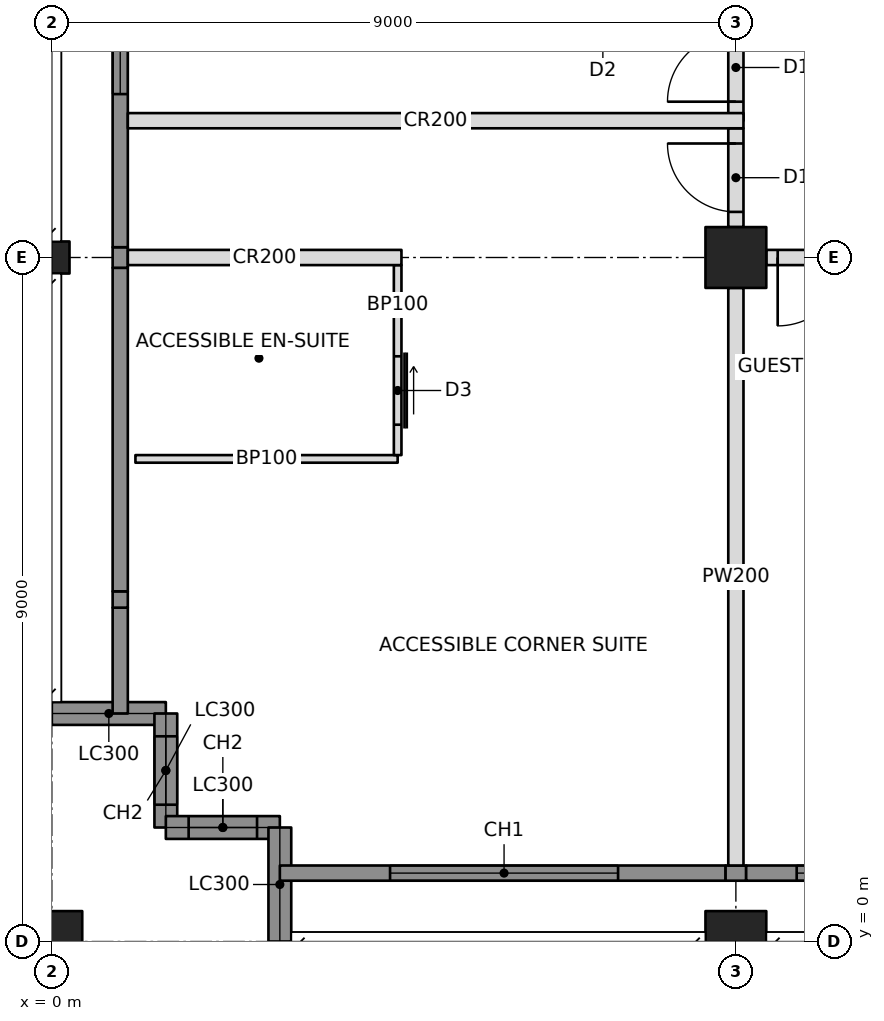
"""IFC4 building model, lengths in metres.
Left out: names, types, materials, properties, quantities, classifications, styles, units other than length and angle.
Written with IfcOpenShell. Run it as: python <this file> out.ifc"""

import sys

from ifc_helpers import new_model, si_unit, direction, frame, frame_2d, origin, origin_with_axes, origin_2d, place, context, subcontext, project, spatial, rectangle, hollow_rectangle, i_section, extrude, element, fill, save


model = new_model("IFC4")
c1 = context("Model", 3, precision=1e-05, world=origin(), true_north=direction((0.0, 1.0)))
c2 = subcontext(c1, "Body", "Model", "MODEL_VIEW")
j1 = project(units=[si_unit("LENGTHUNIT", "METRE"), si_unit("PLANEANGLEUNIT", "RADIAN")], contexts=[c1])
p1 = place(None, origin())
s1 = spatial("IfcSite", under=j1, at=p1, CompositionType="ELEMENT")
p2 = place(p1, origin())
s2 = spatial("IfcBuilding", under=s1, at=p2, CompositionType="ELEMENT")
p3 = place(p2, frame((0.0, 0.0, 244.6)))
s3 = spatial("IfcBuildingStorey", under=s2, at=p3, CompositionType="ELEMENT", Elevation=244.6)
p4 = place(p3, origin_with_axes())
e1 = element("IfcColumn", 1, at=p4, inside=s3, PredefinedType="COLUMN", context=c2, shape_type="SweptSolid", body=[
    extrude(hollow_rectangle(XDim=0.8, YDim=0.8, WallThickness=0.05, at=origin_2d()), origin(), (0.0, 0.0, 1.0), 3.6),
])
p5 = place(p3, frame((0.0, 9.0, 0.0), z_axis=(0.0, 0.0, 1.0), x_axis=(0.0, 1.0, 0.0)))
e2 = element("IfcColumn", 2, at=p5, inside=s3, PredefinedType="COLUMN", context=c2, shape_type="SweptSolid", body=[
    extrude(i_section(OverallWidth=0.422, OverallDepth=0.465, WebThickness=0.045, FlangeThickness=0.073, at=origin_2d()), origin(), (0.0, 0.0, 1.0), 3.6),
])
p6 = place(p3, frame((9.0, 0.0, 0.0), z_axis=(0.0, 0.0, 1.0), x_axis=(1.0, 0.0, 0.0)))
e3 = element("IfcColumn", 3, at=p6, inside=s3, PredefinedType="COLUMN", context=c2, shape_type="SweptSolid", body=[
    extrude(hollow_rectangle(XDim=0.8, YDim=0.8, WallThickness=0.05, at=origin_2d()), origin(), (0.0, 0.0, 1.0), 3.6),
])
p7 = place(p3, frame((9.0, 9.0, 0.0), z_axis=(0.0, 0.0, 1.0), x_axis=(1.0, 0.0, 0.0)))
e4 = element("IfcColumn", 4, at=p7, inside=s3, PredefinedType="COLUMN", context=c2, shape_type="SweptSolid", body=[
    extrude(hollow_rectangle(XDim=0.8, YDim=0.8, WallThickness=0.04, at=origin_2d()), origin(), (0.0, 0.0, 1.0), 3.6),
])
p8 = place(p3, frame((0.0, 3.0, 0.0), z_axis=(0.0, 0.0, 1.0), x_axis=(1.0, 0.0, 0.0)))
e5 = element("IfcWall", 5, at=p8, inside=s3, PredefinedType="SOLIDWALL", context=c2, shape_type="SweptSolid", body=[
    extrude(rectangle(XDim=1.5, YDim=0.3, at=frame_2d((0.75, 0.0))), origin(), (0.0, 0.0, 1.0), 2.62),
])
p9 = place(p3, frame((1.5, 3.0, 0.0), z_axis=(0.0, 0.0, 1.0), x_axis=(0.0, -1.0, 0.0)))
e6 = element("IfcWall", 6, at=p9, inside=s3, PredefinedType="SOLIDWALL", context=c2, shape_type="SweptSolid", body=[
    extrude(rectangle(XDim=1.5, YDim=0.3, at=frame_2d((0.75, 0.0))), origin(), (0.0, 0.0, 1.0), 3.4),
])
p10 = place(p9, frame((0.3, 0.0, 0.6)))
e7 = element("IfcOpeningElement", 7, at=p10, cuts=e6, PredefinedType="OPENING", context=c2, shape_type="SweptSolid", body=[
    extrude(rectangle(XDim=0.9, YDim=2.2, at=frame_2d((0.45, 1.1))), frame((0.0, 0.16, 0.0), z_axis=(0.0, -1.0, 0.0), x_axis=(1.0, 0.0, 0.0)), (0.0, 0.0, 1.0), 0.32),
])
p11 = place(p3, frame((1.5, 1.5, 0.0), z_axis=(0.0, 0.0, 1.0), x_axis=(1.0, 0.0, 0.0)))
e8 = element("IfcWall", 8, at=p11, inside=s3, PredefinedType="SOLIDWALL", context=c2, shape_type="SweptSolid", body=[
    extrude(rectangle(XDim=1.5, YDim=0.3, at=frame_2d((0.75, 0.0))), origin(), (0.0, 0.0, 1.0), 3.4),
])
p12 = place(p11, frame((0.3, 0.0, 0.6)))
e9 = element("IfcOpeningElement", 9, at=p12, cuts=e8, PredefinedType="OPENING", context=c2, shape_type="SweptSolid", body=[
    extrude(rectangle(XDim=0.9, YDim=2.2, at=frame_2d((0.45, 1.1))), frame((0.0, 0.16, 0.0), z_axis=(0.0, -1.0, 0.0), x_axis=(1.0, 0.0, 0.0)), (0.0, 0.0, 1.0), 0.32),
])
p13 = place(p3, frame((3.0, 1.5, 0.0), z_axis=(0.0, 0.0, 1.0), x_axis=(0.0, -1.0, 0.0)))
e10 = element("IfcWall", 10, at=p13, inside=s3, PredefinedType="SOLIDWALL", context=c2, shape_type="SweptSolid", body=[
    extrude(rectangle(XDim=1.5, YDim=0.3, at=frame_2d((0.75, 0.0))), origin(), (0.0, 0.0, 1.0), 2.62),
])
p14 = place(p3, frame((3.0, 0.9, 0.0), z_axis=(0.0, 0.0, 1.0), x_axis=(1.0, 0.0, 0.0)))
e11 = element("IfcWall", 11, at=p14, inside=s3, PredefinedType="SOLIDWALL", context=c2, shape_type="SweptSolid", body=[
    extrude(rectangle(XDim=5.865, YDim=0.2, at=frame_2d((2.932, 0.0))), origin(), (0.0, 0.0, 1.0), 3.4),
])
p15 = place(p14, frame((1.45, 0.0, 0.6)))
e12 = element("IfcOpeningElement", 12, at=p15, cuts=e11, PredefinedType="OPENING", context=c2, shape_type="SweptSolid", body=[
    extrude(rectangle(XDim=3.0, YDim=2.2, at=frame_2d((1.5, 1.1))), frame((0.0, 0.11, 0.0), z_axis=(0.0, -1.0, 0.0), x_axis=(1.0, 0.0, 0.0)), (0.0, 0.0, 1.0), 0.22),
])
p16 = place(p3, frame((0.9, 3.0, 0.0), z_axis=(0.0, 0.0, 1.0), x_axis=(0.0, 1.0, 0.0)))
e13 = element("IfcWall", 13, at=p16, inside=s3, PredefinedType="SOLIDWALL", context=c2, shape_type="SweptSolid", body=[
    extrude(rectangle(XDim=1.393, YDim=0.2, at=frame_2d((0.696, 0.0))), origin(), (0.0, 0.0, 1.0), 3.4),
])
p17 = place(p3, frame((1.0, 9.0, 0.0), z_axis=(0.0, 0.0, 1.0), x_axis=(1.0, 0.0, 0.0)))
e14 = element("IfcWall", 14, at=p17, inside=s3, PredefinedType="PARTITIONING", context=c2, shape_type="SweptSolid", body=[
    extrude(rectangle(XDim=3.6, YDim=0.2, at=frame_2d((1.8, 0.0))), origin(), (0.0, 0.0, 1.0), 2.638),
])
p18 = place(p3, frame((9.4, 9.0, 0.0), z_axis=(0.0, 0.0, 1.0), x_axis=(1.0, 0.0, 0.0)))
e15 = element("IfcWall", 15, at=p18, inside=s3, PredefinedType="PARTITIONING", context=c2, shape_type="SweptSolid", body=[
    extrude(rectangle(XDim=8.2, YDim=0.2, at=frame_2d((4.1, 0.0))), origin(), (0.0, 0.0, 1.0), 2.605),
])
p19 = place(p18, frame((0.15, 0.0, 0.0)))
e16 = element("IfcOpeningElement", 16, at=p19, cuts=e15, PredefinedType="OPENING", context=c2, shape_type="SweptSolid", body=[
    extrude(rectangle(XDim=0.9, YDim=2.1, at=frame_2d((0.45, 1.05))), frame((0.0, 0.11, 0.0), z_axis=(0.0, -1.0, 0.0), x_axis=(1.0, 0.0, 0.0)), (0.0, 0.0, 1.0), 0.22),
])
p20 = place(p3, frame((9.0, 10.8, 0.0), z_axis=(0.0, 0.0, 1.0), x_axis=(0.0, 1.0, 0.0)))
e17 = element("IfcWall", 17, at=p20, inside=s3, PredefinedType="PARTITIONING", context=c2, shape_type="SweptSolid", body=[
    extrude(rectangle(XDim=6.8, YDim=0.2, at=frame_2d((3.4, 0.0))), origin(), (0.0, 0.0, 1.0), 2.605),
])
p21 = place(p20, frame((0.25, 0.0, 0.0)))
e18 = element("IfcOpeningElement", 18, at=p21, cuts=e17, PredefinedType="OPENING", context=c2, shape_type="SweptSolid", body=[
    extrude(rectangle(XDim=0.9, YDim=2.1, at=frame_2d((0.45, 1.05))), frame((0.0, 0.11, 0.0), z_axis=(0.0, -1.0, 0.0), x_axis=(1.0, 0.0, 0.0)), (0.0, 0.0, 1.0), 0.22),
])
p22 = place(p20, frame((3.85, 0.0, 0.0)))
e19 = element("IfcOpeningElement", 19, at=p22, cuts=e17, PredefinedType="OPENING", context=c2, shape_type="SweptSolid", body=[
    extrude(rectangle(XDim=0.9, YDim=2.1, at=frame_2d((0.45, 1.05))), frame((0.0, 0.11, 0.0), z_axis=(0.0, -1.0, 0.0), x_axis=(1.0, 0.0, 0.0)), (0.0, 0.0, 1.0), 0.22),
])
p23 = place(p3, frame((1.0, 10.8, 0.0), z_axis=(0.0, 0.0, 1.0), x_axis=(1.0, 0.0, 0.0)))
e20 = element("IfcWall", 20, at=p23, inside=s3, PredefinedType="PARTITIONING", context=c2, shape_type="SweptSolid", body=[
    extrude(rectangle(XDim=8.1, YDim=0.2, at=frame_2d((4.05, 0.0))), origin(), (0.0, 0.0, 1.0), 2.604),
])
p24 = place(p3, frame((9.0, 8.6, 0.0), z_axis=(0.0, 0.0, 1.0), x_axis=(0.0, -1.0, 0.0)))
e21 = element("IfcWall", 21, at=p24, inside=s3, PredefinedType="PARTITIONING", context=c2, shape_type="SweptSolid", body=[
    extrude(rectangle(XDim=7.6, YDim=0.2, at=frame_2d((3.8, 0.0))), origin(), (0.0, 0.0, 1.0), 2.638),
])
p25 = place(p3, frame((1.1, 6.35, 0.0), z_axis=(0.0, 0.0, 1.0), x_axis=(1.0, 0.0, 0.0)))
e22 = element("IfcWall", 22, at=p25, inside=s3, PredefinedType="PARTITIONING", context=c2, shape_type="SweptSolid", body=[
    extrude(rectangle(XDim=3.45, YDim=0.1, at=frame_2d((1.725, 0.0))), origin(), (0.0, 0.0, 1.0), 3.4),
])
p26 = place(p3, frame((4.55, 8.9, 0.0), z_axis=(0.0, 0.0, 1.0), x_axis=(0.0, -1.0, 0.0)))
e23 = element("IfcWall", 23, at=p26, inside=s3, PredefinedType="PARTITIONING", context=c2, shape_type="SweptSolid", body=[
    extrude(rectangle(XDim=2.5, YDim=0.1, at=frame_2d((1.25, 0.0))), origin(), (0.0, 0.0, 1.0), 2.638),
])
p27 = place(p26, frame((1.2, 0.0, 0.0)))
e24 = element("IfcOpeningElement", 24, at=p27, cuts=e23, PredefinedType="OPENING", context=c2, shape_type="SweptSolid", body=[
    extrude(rectangle(XDim=0.9, YDim=2.1, at=frame_2d((0.45, 1.05))), frame((0.0, 0.06, 0.0), z_axis=(0.0, -1.0, 0.0), x_axis=(1.0, 0.0, 0.0)), (0.0, 0.0, 1.0), 0.12),
])
p28 = place(p3, frame((9.0, 9.4, 0.0), z_axis=(0.0, 0.0, 1.0), x_axis=(0.0, 1.0, 0.0)))
e25 = element("IfcWall", 25, at=p28, inside=s3, PredefinedType="PARTITIONING", context=c2, shape_type="SweptSolid", body=[
    extrude(rectangle(XDim=1.3, YDim=0.2, at=frame_2d((0.65, 0.0))), origin(), (0.0, 0.0, 1.0), 2.605),
])
p29 = place(p28, frame((0.2, 0.0, 0.0)))
e26 = element("IfcOpeningElement", 26, at=p29, cuts=e25, PredefinedType="OPENING", context=c2, shape_type="SweptSolid", body=[
    extrude(rectangle(XDim=0.9, YDim=2.1, at=frame_2d((0.45, 1.05))), frame((0.0, 0.11, 0.0), z_axis=(0.0, -1.0, 0.0), x_axis=(1.0, 0.0, 0.0)), (0.0, 0.0, 1.0), 0.22),
])
p30 = place(p3, frame((8.865, 0.9, 0.0), z_axis=(0.0, 0.0, 1.0), x_axis=(1.0, 0.0, 0.0)))
e27 = element("IfcWall", 27, at=p30, inside=s3, PredefinedType="SOLIDWALL", context=c2, shape_type="SweptSolid", body=[
    extrude(rectangle(XDim=0.271, YDim=0.2, at=frame_2d((0.135, 0.0))), origin(), (0.0, 0.0, 1.0), 2.638),
])
p31 = place(p3, frame((9.135, 0.9, 0.0), z_axis=(0.0, 0.0, 1.0), x_axis=(1.0, 0.0, 0.0)))
e28 = element("IfcWall", 28, at=p31, inside=s3, PredefinedType="SOLIDWALL", context=c2, shape_type="SweptSolid", body=[
    extrude(rectangle(XDim=8.671, YDim=0.2, at=frame_2d((4.335, 0.0))), origin(), (0.0, 0.0, 1.0), 3.4),
])
p32 = place(p31, frame((0.665, 0.0, 0.6)))
e29 = element("IfcOpeningElement", 29, at=p32, cuts=e28, PredefinedType="OPENING", context=c2, shape_type="SweptSolid", body=[
    extrude(rectangle(XDim=3.0, YDim=2.2, at=frame_2d((1.5, 1.1))), frame((0.0, 0.11, 0.0), z_axis=(0.0, -1.0, 0.0), x_axis=(1.0, 0.0, 0.0)), (0.0, 0.0, 1.0), 0.22),
])
p33 = place(p31, frame((5.065, 0.0, 0.6)))
e30 = element("IfcOpeningElement", 30, at=p33, cuts=e28, PredefinedType="OPENING", context=c2, shape_type="SweptSolid", body=[
    extrude(rectangle(XDim=3.0, YDim=2.2, at=frame_2d((1.5, 1.1))), frame((0.0, 0.11, 0.0), z_axis=(0.0, -1.0, 0.0), x_axis=(1.0, 0.0, 0.0)), (0.0, 0.0, 1.0), 0.22),
])
p34 = place(p3, frame((0.9, 4.393, 0.0), z_axis=(0.0, 0.0, 1.0), x_axis=(0.0, 1.0, 0.0)))
e31 = element("IfcWall", 31, at=p34, inside=s3, PredefinedType="SOLIDWALL", context=c2, shape_type="SweptSolid", body=[
    extrude(rectangle(XDim=0.215, YDim=0.2, at=frame_2d((0.107, 0.0))), origin(), (0.0, 0.0, 1.0), 2.861),
])
p35 = place(p3, frame((0.9, 4.607, 0.0), z_axis=(0.0, 0.0, 1.0), x_axis=(0.0, 1.0, 0.0)))
e32 = element("IfcWall", 32, at=p35, inside=s3, PredefinedType="SOLIDWALL", context=c2, shape_type="SweptSolid", body=[
    extrude(rectangle(XDim=4.257, YDim=0.2, at=frame_2d((2.129, 0.0))), origin(), (0.0, 0.0, 1.0), 3.4),
])
p36 = place(p3, frame((0.9, 8.865, 0.0), z_axis=(0.0, 0.0, 1.0), x_axis=(0.0, 1.0, 0.0)))
e33 = element("IfcWall", 33, at=p36, inside=s3, PredefinedType="SOLIDWALL", context=c2, shape_type="SweptSolid", body=[
    extrude(rectangle(XDim=0.271, YDim=0.2, at=frame_2d((0.135, 0.0))), origin(), (0.0, 0.0, 1.0), 2.638),
])
p37 = place(p3, frame((0.9, 9.135, 0.0), z_axis=(0.0, 0.0, 1.0), x_axis=(0.0, 1.0, 0.0)))
e34 = element("IfcWall", 34, at=p37, inside=s3, PredefinedType="SOLIDWALL", context=c2, shape_type="SweptSolid", body=[
    extrude(rectangle(XDim=8.671, YDim=0.2, at=frame_2d((4.335, 0.0))), origin(), (0.0, 0.0, 1.0), 3.4),
])
p38 = place(p37, frame((2.015, 0.0, 0.6)))
e35 = element("IfcOpeningElement", 35, at=p38, cuts=e34, PredefinedType="OPENING", context=c2, shape_type="SweptSolid", body=[
    extrude(rectangle(XDim=3.0, YDim=2.2, at=frame_2d((1.5, 1.1))), frame((0.0, 0.11, 0.0), z_axis=(0.0, -1.0, 0.0), x_axis=(1.0, 0.0, 0.0)), (0.0, 0.0, 1.0), 0.22),
])
p39 = place(p37, frame((5.515, 0.0, 0.6)))
e36 = element("IfcOpeningElement", 36, at=p39, cuts=e34, PredefinedType="OPENING", context=c2, shape_type="SweptSolid", body=[
    extrude(rectangle(XDim=3.0, YDim=2.2, at=frame_2d((1.5, 1.1))), frame((0.0, 0.11, 0.0), z_axis=(0.0, -1.0, 0.0), x_axis=(1.0, 0.0, 0.0)), (0.0, 0.0, 1.0), 0.22),
])
p40 = place(p10, origin())
e37 = element("IfcWindow", 37, at=p40, inside=s3, PartitioningType="SINGLE_PANEL", PredefinedType="WINDOW", context=c2, shape_type="SweptSolid", body=[
    extrude(rectangle(XDim=0.9, YDim=2.2, at=frame_2d((0.45, 1.1))), frame((0.0, 0.03, 0.0), z_axis=(0.0, -1.0, 0.0), x_axis=(1.0, 0.0, 0.0)), (0.0, 0.0, 1.0), 0.06),
])
fill(e7, e37)
p41 = place(p12, origin())
e38 = element("IfcWindow", 38, at=p41, inside=s3, PartitioningType="SINGLE_PANEL", PredefinedType="WINDOW", context=c2, shape_type="SweptSolid", body=[
    extrude(rectangle(XDim=0.9, YDim=2.2, at=frame_2d((0.45, 1.1))), frame((0.0, 0.03, 0.0), z_axis=(0.0, -1.0, 0.0), x_axis=(1.0, 0.0, 0.0)), (0.0, 0.0, 1.0), 0.06),
])
fill(e9, e38)
p42 = place(p15, origin())
e39 = element("IfcWindow", 39, at=p42, inside=s3, PartitioningType="TRIPLE_PANEL_VERTICAL", PredefinedType="WINDOW", context=c2, shape_type="SweptSolid", body=[
    extrude(rectangle(XDim=3.0, YDim=2.2, at=frame_2d((1.5, 1.1))), frame((0.0, 0.03, 0.0), z_axis=(0.0, -1.0, 0.0), x_axis=(1.0, 0.0, 0.0)), (0.0, 0.0, 1.0), 0.06),
])
fill(e12, e39)
p43 = place(p32, origin())
e40 = element("IfcWindow", 40, at=p43, inside=s3, PartitioningType="TRIPLE_PANEL_VERTICAL", PredefinedType="WINDOW", context=c2, shape_type="SweptSolid", body=[
    extrude(rectangle(XDim=3.0, YDim=2.2, at=frame_2d((1.5, 1.1))), frame((0.0, 0.03, 0.0), z_axis=(0.0, -1.0, 0.0), x_axis=(1.0, 0.0, 0.0)), (0.0, 0.0, 1.0), 0.06),
])
fill(e29, e40)
p44 = place(p38, origin())
e41 = element("IfcWindow", 41, at=p44, inside=s3, PartitioningType="TRIPLE_PANEL_VERTICAL", PredefinedType="WINDOW", context=c2, shape_type="SweptSolid", body=[
    extrude(rectangle(XDim=3.0, YDim=2.2, at=frame_2d((1.5, 1.1))), frame((0.0, 0.03, 0.0), z_axis=(0.0, -1.0, 0.0), x_axis=(1.0, 0.0, 0.0)), (0.0, 0.0, 1.0), 0.06),
])
fill(e35, e41)
p45 = place(p27, origin())
e42 = element("IfcDoor", 42, at=p45, inside=s3, OperationType="SLIDING_TO_LEFT", PredefinedType="DOOR", context=c2, shape_type="SweptSolid", body=[
    extrude(rectangle(XDim=0.9, YDim=2.1, at=frame_2d((0.45, 1.05))), frame((0.0, 0.025, 0.0), z_axis=(0.0, -1.0, 0.0), x_axis=(1.0, 0.0, 0.0)), (0.0, 0.0, 1.0), 0.05),
])
fill(e24, e42)
p46 = place(p19, frame((0.9, 0.0, 0.0), z_axis=(0.0, 0.0, 1.0), x_axis=(-1.0, 0.0, 0.0)))
e43 = element("IfcDoor", 43, at=p46, inside=s3, OperationType="SINGLE_SWING_RIGHT", PredefinedType="DOOR", context=c2, shape_type="SweptSolid", body=[
    extrude(rectangle(XDim=0.9, YDim=2.1, at=frame_2d((0.45, 1.05))), frame((0.0, 0.025, 0.0), z_axis=(0.0, -1.0, 0.0), x_axis=(1.0, 0.0, 0.0)), (0.0, 0.0, 1.0), 0.05),
])
fill(e16, e43)
p47 = place(p21, origin())
e44 = element("IfcDoor", 44, at=p47, inside=s3, OperationType="SINGLE_SWING_LEFT", PredefinedType="DOOR", context=c2, shape_type="SweptSolid", body=[
    extrude(rectangle(XDim=0.9, YDim=2.1, at=frame_2d((0.45, 1.05))), frame((0.0, 0.025, 0.0), z_axis=(0.0, -1.0, 0.0), x_axis=(1.0, 0.0, 0.0)), (0.0, 0.0, 1.0), 0.05),
])
fill(e18, e44)
p48 = place(p29, origin())
e45 = element("IfcDoor", 45, at=p48, inside=s3, OperationType="SINGLE_SWING_RIGHT", PredefinedType="DOOR", context=c2, shape_type="SweptSolid", body=[
    extrude(rectangle(XDim=0.9, YDim=2.1, at=frame_2d((0.45, 1.05))), frame((0.0, 0.025, 0.0), z_axis=(0.0, -1.0, 0.0), x_axis=(1.0, 0.0, 0.0)), (0.0, 0.0, 1.0), 0.05),
])
fill(e26, e45)
save(model, sys.argv[1])
